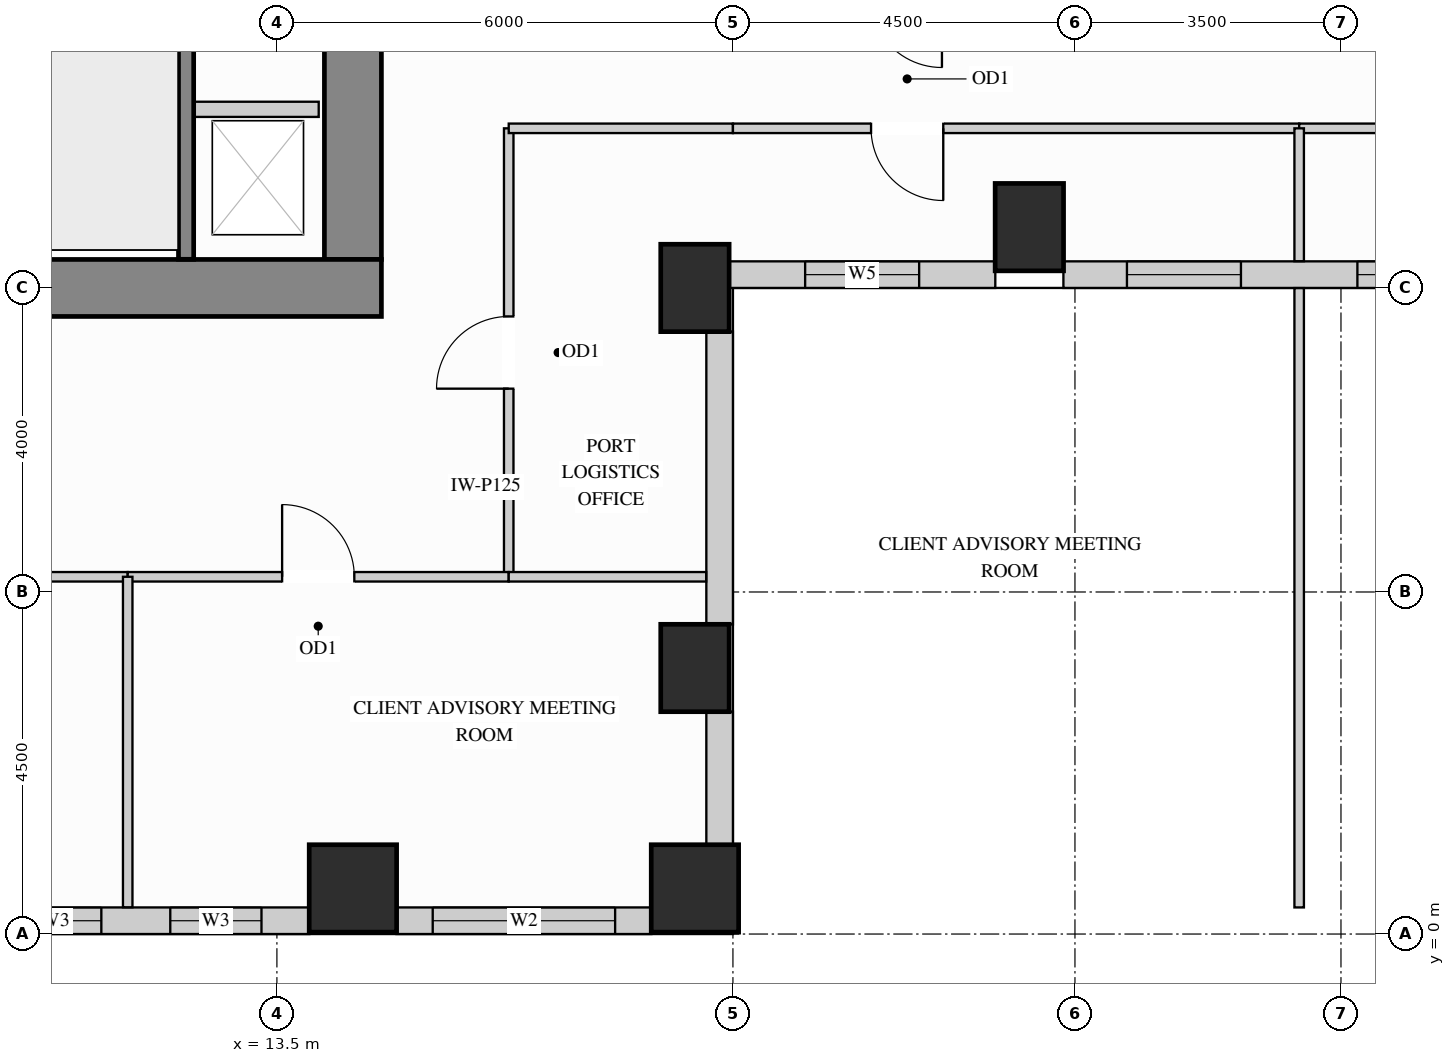
"""IFC4 building model, lengths in metres.
Left out: names, types, materials, properties, quantities, classifications, styles, units other than length and angle.
Written with IfcOpenShell. Run it as: python <this file> out.ifc"""

import sys

from ifc_helpers import new_model, si_unit, direction, frame, frame_2d, origin, origin_2d, place, context, subcontext, project, spatial, rectangle, extrude, source, transform, mapped, element, fill, save


model = new_model("IFC4")
c1 = context("Model", 3, precision=1e-05, world=origin(), true_north=direction((0.0, 1.0)))
c2 = subcontext(c1, "Body", "Model", "MODEL_VIEW")
j1 = project(units=[si_unit("LENGTHUNIT", "METRE"), si_unit("PLANEANGLEUNIT", "RADIAN")], contexts=[c1])
p1 = place(None, origin())
s1 = spatial("IfcSite", under=j1, at=p1, CompositionType="ELEMENT")
p2 = place(p1, origin())
s2 = spatial("IfcBuilding", under=s1, at=p2, CompositionType="ELEMENT")
p3 = place(p2, frame((0.0, 0.0, 124.2)))
s3 = spatial("IfcBuildingStorey", under=s2, at=p3, CompositionType="ELEMENT", Elevation=124.2)
m1 = source(origin(), c2, "Body", "SweptSolid", [
    extrude(rectangle(XDim=0.9, YDim=1.15, at=origin_2d()), origin(), (0.0, 0.0, 1.0), 3.38),
])
for number, where, z_axis, x_axis in (
    (1, (19.0, 3.5, 0.0), (0.0, 0.0, 1.0), (1.0, 0.0, 0.0)),
    (2, (19.0, 8.5, 0.0), (0.0, 0.0, 1.0), (1.0, 0.0, 0.0)),
    (3, (23.4, 9.3, 0.0), (0.0, 0.0, 1.0), (1.0, 0.0, 0.0)),
):
    element("IfcColumn", number, at=place(p3, frame(where, z_axis=z_axis, x_axis=x_axis)), inside=s3, PredefinedType="COLUMN", context=c2, shape_type="MappedRepresentation", body=[
        mapped(m1, transform((0.0, 0.0, 0.0), x_axis=(1.0, 0.0, 0.0), y_axis=(0.0, 1.0, 0.0), z_axis=(0.0, 0.0, 1.0))),
    ])
m2 = source(origin(), c2, "Body", "SweptSolid", [
    extrude(rectangle(XDim=1.15, YDim=1.15, at=origin_2d()), origin(), (0.0, 0.0, 1.0), 3.38),
])
for number, where, z_axis, x_axis in (
    (4, (14.5, 0.6, 0.0), (0.0, 0.0, 1.0), (1.0, 0.0, 0.0)),
    (5, (19.0, 0.6, 0.0), (0.0, 0.0, 1.0), (1.0, 0.0, 0.0)),
):
    element("IfcColumn", number, at=place(p3, frame(where, z_axis=z_axis, x_axis=x_axis)), inside=s3, PredefinedType="COLUMN", context=c2, shape_type="MappedRepresentation", body=[
        mapped(m2, transform((0.0, 0.0, 0.0), x_axis=(1.0, 0.0, 0.0), y_axis=(0.0, 1.0, 0.0), z_axis=(0.0, 0.0, 1.0))),
    ])
m3 = source(origin(), c2, "Body", "SweptSolid", [
    extrude(rectangle(XDim=9.945, YDim=0.75, at=frame_2d((4.973, 0.0))), origin(), (0.0, 0.0, 1.0), 3.38),
])
p4 = place(p3, frame((14.5, 8.875, 0.0), z_axis=(0.0, 0.0, 1.0), x_axis=(0.0, 1.0, 0.0)))
e6 = element("IfcWall", 6, at=p4, inside=s3, PredefinedType="SHEAR", context=c2, shape_type="MappedRepresentation", body=[
    mapped(m3, transform((0.0, 0.0, 0.0), x_axis=(1.0, 0.0, 0.0), y_axis=(0.0, 1.0, 0.0), z_axis=(0.0, 0.0, 1.0))),
])
m4 = source(origin(), c2, "Body", "SweptSolid", [
    extrude(rectangle(XDim=10.75, YDim=0.75, at=frame_2d((5.375, 0.0))), origin(), (0.0, 0.0, 1.0), 3.38),
])
p5 = place(p3, frame((4.125, 8.5, 0.0), z_axis=(0.0, 0.0, 1.0), x_axis=(1.0, 0.0, 0.0)))
e7 = element("IfcWall", 7, at=p5, inside=s3, PredefinedType="SHEAR", context=c2, shape_type="MappedRepresentation", body=[
    mapped(m4, transform((0.0, 0.0, 0.0), x_axis=(1.0, 0.0, 0.0), y_axis=(0.0, 1.0, 0.0), z_axis=(0.0, 0.0, 1.0))),
])
p6 = place(p3, frame((9.573, 0.175, 0.0), z_axis=(0.0, 0.0, 1.0), x_axis=(1.0, 0.0, 0.0)))
e8 = element("IfcWall", 8, at=p6, inside=s3, PredefinedType="SOLIDWALL", context=c2, shape_type="SweptSolid", body=[
    extrude(rectangle(XDim=4.354, YDim=0.35, at=frame_2d((2.177, 0.0))), origin(), (0.0, 0.0, 1.0), 3.365),
])
p7 = place(p6, frame((0.417, 0.0, 0.78)))
e9 = element("IfcOpeningElement", 9, at=p7, cuts=e8, PredefinedType="OPENING", context=c2, shape_type="SweptSolid", body=[
    extrude(rectangle(XDim=1.2, YDim=2.1, at=frame_2d((0.6, 1.05))), frame((0.0, 0.185, 0.0), z_axis=(0.0, -1.0, 0.0), x_axis=(1.0, 0.0, 0.0)), (0.0, 0.0, 1.0), 0.37),
])
p8 = place(p6, frame((2.524, 0.0, 0.78)))
e10 = element("IfcOpeningElement", 10, at=p8, cuts=e8, PredefinedType="OPENING", context=c2, shape_type="SweptSolid", body=[
    extrude(rectangle(XDim=1.2, YDim=2.1, at=frame_2d((0.6, 1.05))), frame((0.0, 0.185, 0.0), z_axis=(0.0, -1.0, 0.0), x_axis=(1.0, 0.0, 0.0)), (0.0, 0.0, 1.0), 0.37),
])
p9 = place(p3, frame((15.073, 0.175, 0.0), z_axis=(0.0, 0.0, 1.0), x_axis=(1.0, 0.0, 0.0)))
e11 = element("IfcWall", 11, at=p9, inside=s3, PredefinedType="SOLIDWALL", context=c2, shape_type="SweptSolid", body=[
    extrude(rectangle(XDim=3.354, YDim=0.35, at=frame_2d((1.677, 0.0))), origin(), (0.0, 0.0, 1.0), 3.365),
])
p10 = place(p9, frame((0.477, 0.0, 0.78)))
e12 = element("IfcOpeningElement", 12, at=p10, cuts=e11, PredefinedType="OPENING", context=c2, shape_type="SweptSolid", body=[
    extrude(rectangle(XDim=2.4, YDim=2.1, at=frame_2d((1.2, 1.05))), frame((0.0, 0.185, 0.0), z_axis=(0.0, -1.0, 0.0), x_axis=(1.0, 0.0, 0.0)), (0.0, 0.0, 1.0), 0.37),
])
m5 = source(origin(), c2, "Body", "SweptSolid", [
    extrude(rectangle(XDim=1.754, YDim=0.35, at=frame_2d((0.877, 0.0))), origin(), (0.0, 0.0, 1.0), 2.519),
])
p11 = place(p3, frame((19.325, 1.173, 0.0), z_axis=(0.0, 0.0, 1.0), x_axis=(0.0, 1.0, 0.0)))
e13 = element("IfcWall", 13, at=p11, inside=s3, PredefinedType="SOLIDWALL", context=c2, shape_type="MappedRepresentation", body=[
    mapped(m5, transform((0.0, 0.0, 0.0), x_axis=(1.0, 0.0, 0.0), y_axis=(0.0, 1.0, 0.0), z_axis=(0.0, 0.0, 1.0))),
])
m6 = source(origin(), c2, "Body", "SweptSolid", [
    extrude(rectangle(XDim=3.854, YDim=0.35, at=frame_2d((1.927, 0.0))), origin(), (0.0, 0.0, 1.0), 2.519),
])
p12 = place(p3, frame((19.325, 4.073, 0.0), z_axis=(0.0, 0.0, 1.0), x_axis=(0.0, 1.0, 0.0)))
e14 = element("IfcWall", 14, at=p12, inside=s3, PredefinedType="SOLIDWALL", context=c2, shape_type="MappedRepresentation", body=[
    mapped(m6, transform((0.0, 0.0, 0.0), x_axis=(1.0, 0.0, 0.0), y_axis=(0.0, 1.0, 0.0), z_axis=(0.0, 0.0, 1.0))),
])
p13 = place(p3, frame((19.448, 8.675, 0.0), z_axis=(0.0, 0.0, 1.0), x_axis=(1.0, 0.0, 0.0)))
e15 = element("IfcWall", 15, at=p13, inside=s3, PredefinedType="SOLIDWALL", context=c2, shape_type="SweptSolid", body=[
    extrude(rectangle(XDim=3.504, YDim=0.35, at=frame_2d((1.752, 0.0))), origin(), (0.0, 0.0, 1.0), 3.365),
])
p14 = place(p13, frame((1.002, 0.0, 0.78)))
e16 = element("IfcOpeningElement", 16, at=p14, cuts=e15, PredefinedType="OPENING", context=c2, shape_type="SweptSolid", body=[
    extrude(rectangle(XDim=1.5, YDim=2.0, at=frame_2d((0.75, 1.0))), frame((0.0, 0.185, 0.0), z_axis=(0.0, -1.0, 0.0), x_axis=(1.0, 0.0, 0.0)), (0.0, 0.0, 1.0), 0.37),
])
p15 = place(p3, frame((23.848, 8.675, 0.0), z_axis=(0.0, 0.0, 1.0), x_axis=(1.0, 0.0, 0.0)))
e17 = element("IfcWall", 17, at=p15, inside=s3, PredefinedType="SOLIDWALL", context=c2, shape_type="SweptSolid", body=[
    extrude(rectangle(XDim=6.204, YDim=0.35, at=frame_2d((3.102, 0.0))), origin(), (0.0, 0.0, 1.0), 3.365),
])
p16 = place(p15, frame((0.836, 0.0, 0.78)))
e18 = element("IfcOpeningElement", 18, at=p16, cuts=e17, PredefinedType="OPENING", context=c2, shape_type="SweptSolid", body=[
    extrude(rectangle(XDim=1.5, YDim=2.0, at=frame_2d((0.75, 1.0))), frame((0.0, 0.185, 0.0), z_axis=(0.0, -1.0, 0.0), x_axis=(1.0, 0.0, 0.0)), (0.0, 0.0, 1.0), 0.37),
])
p17 = place(p15, frame((3.868, 0.0, 0.78)))
e19 = element("IfcOpeningElement", 19, at=p17, cuts=e17, PredefinedType="OPENING", context=c2, shape_type="SweptSolid", body=[
    extrude(rectangle(XDim=1.5, YDim=2.0, at=frame_2d((0.75, 1.0))), frame((0.0, 0.185, 0.0), z_axis=(0.0, -1.0, 0.0), x_axis=(1.0, 0.0, 0.0)), (0.0, 0.0, 1.0), 0.37),
])
p18 = place(p3, frame((16.55, 4.7, 0.0), z_axis=(0.0, 0.0, 1.0), x_axis=(0.0, 1.0, 0.0)))
e20 = element("IfcWall", 20, at=p18, inside=s3, PredefinedType="PARTITIONING", context=c2, shape_type="SweptSolid", body=[
    extrude(rectangle(XDim=5.9, YDim=0.125, at=frame_2d((2.95, 0.0))), origin(), (0.0, 0.0, 1.0), 3.365),
])
p19 = place(p18, frame((2.475, 0.0, 0.0)))
e21 = element("IfcOpeningElement", 21, at=p19, cuts=e20, PredefinedType="OPENING", context=c2, shape_type="SweptSolid", body=[
    extrude(rectangle(XDim=0.95, YDim=2.15, at=frame_2d((0.475, 1.075))), frame((0.0, 0.073, 0.0), z_axis=(0.0, -1.0, 0.0), x_axis=(1.0, 0.0, 0.0)), (0.0, 0.0, 1.0), 0.145),
])
m7 = source(origin(), c2, "Body", "SweptSolid", [
    extrude(rectangle(XDim=2.95, YDim=0.125, at=frame_2d((1.475, 0.0))), origin(), (0.0, 0.0, 1.0), 3.365),
])
p20 = place(p3, frame((16.55, 10.6, 0.0), z_axis=(0.0, 0.0, 1.0), x_axis=(1.0, 0.0, 0.0)))
e22 = element("IfcWall", 22, at=p20, inside=s3, PredefinedType="PARTITIONING", context=c2, shape_type="MappedRepresentation", body=[
    mapped(m7, transform((0.0, 0.0, 0.0), x_axis=(1.0, 0.0, 0.0), y_axis=(0.0, 1.0, 0.0), z_axis=(0.0, 0.0, 1.0))),
])
p21 = place(p3, frame((19.5, 10.6, 0.0), z_axis=(0.0, 0.0, 1.0), x_axis=(1.0, 0.0, 0.0)))
e23 = element("IfcWall", 23, at=p21, inside=s3, PredefinedType="PARTITIONING", context=c2, shape_type="SweptSolid", body=[
    extrude(rectangle(XDim=7.45, YDim=0.125, at=frame_2d((3.725, 0.0))), origin(), (0.0, 0.0, 1.0), 3.365),
])
p22 = place(p21, frame((1.817, 0.0, 0.0)))
e24 = element("IfcOpeningElement", 24, at=p22, cuts=e23, PredefinedType="OPENING", context=c2, shape_type="SweptSolid", body=[
    extrude(rectangle(XDim=0.95, YDim=2.15, at=frame_2d((0.475, 1.075))), frame((0.0, 0.073, 0.0), z_axis=(0.0, -1.0, 0.0), x_axis=(1.0, 0.0, 0.0)), (0.0, 0.0, 1.0), 0.145),
])
p23 = place(p3, frame((26.95, 10.6, 0.0), z_axis=(0.0, 0.0, 1.0), x_axis=(1.0, 0.0, 0.0)))
e25 = element("IfcWall", 25, at=p23, inside=s3, PredefinedType="PARTITIONING", context=c2, shape_type="SweptSolid", body=[
    extrude(rectangle(XDim=7.45, YDim=0.125, at=frame_2d((3.725, 0.0))), origin(), (0.0, 0.0, 1.0), 3.365),
])
p24 = place(p23, frame((4.683, 0.0, 0.0)))
e26 = element("IfcOpeningElement", 26, at=p24, cuts=e25, PredefinedType="OPENING", context=c2, shape_type="SweptSolid", body=[
    extrude(rectangle(XDim=0.95, YDim=2.15, at=frame_2d((0.475, 1.075))), frame((0.0, 0.073, 0.0), z_axis=(0.0, -1.0, 0.0), x_axis=(1.0, 0.0, 0.0)), (0.0, 0.0, 1.0), 0.145),
])
m8 = source(origin(), c2, "Body", "SweptSolid", [
    extrude(rectangle(XDim=8.148, YDim=0.125, at=frame_2d((4.074, 0.0))), origin(), (0.0, 0.0, 1.0), 3.365),
])
p25 = place(p3, frame((26.95, 0.35, 0.0), z_axis=(0.0, 0.0, 1.0), x_axis=(0.0, 1.0, 0.0)))
e27 = element("IfcWall", 27, at=p25, inside=s3, PredefinedType="PARTITIONING", context=c2, shape_type="MappedRepresentation", body=[
    mapped(m8, transform((0.0, 0.0, 0.0), x_axis=(1.0, 0.0, 0.0), y_axis=(0.0, 1.0, 0.0), z_axis=(0.0, 0.0, 1.0))),
])
m9 = source(origin(), c2, "Body", "SweptSolid", [
    extrude(rectangle(XDim=1.748, YDim=0.125, at=frame_2d((0.874, 0.0))), origin(), (0.0, 0.0, 1.0), 3.365),
])
p26 = place(p3, frame((26.95, 8.852, 0.0), z_axis=(0.0, 0.0, 1.0), x_axis=(0.0, 1.0, 0.0)))
e28 = element("IfcWall", 28, at=p26, inside=s3, PredefinedType="PARTITIONING", context=c2, shape_type="MappedRepresentation", body=[
    mapped(m9, transform((0.0, 0.0, 0.0), x_axis=(1.0, 0.0, 0.0), y_axis=(0.0, 1.0, 0.0), z_axis=(0.0, 0.0, 1.0))),
])
p27 = place(p3, frame((2.45, 4.7, 0.0), z_axis=(0.0, 0.0, 1.0), x_axis=(1.0, 0.0, 0.0)))
e29 = element("IfcWall", 29, at=p27, inside=s3, PredefinedType="PARTITIONING", context=c2, shape_type="SweptSolid", body=[
    extrude(rectangle(XDim=9.087, YDim=0.125, at=frame_2d((4.543, 0.0))), origin(), (0.0, 0.0, 1.0), 2.828),
])
p28 = place(p27, frame((4.069, 0.0, 0.0)))
e30 = element("IfcOpeningElement", 30, at=p28, cuts=e29, PredefinedType="OPENING", context=c2, shape_type="SweptSolid", body=[
    extrude(rectangle(XDim=0.95, YDim=2.15, at=frame_2d((0.475, 1.075))), frame((0.0, 0.073, 0.0), z_axis=(0.0, -1.0, 0.0), x_axis=(1.0, 0.0, 0.0)), (0.0, 0.0, 1.0), 0.145),
])
p29 = place(p3, frame((11.537, 4.7, 0.0), z_axis=(0.0, 0.0, 1.0), x_axis=(1.0, 0.0, 0.0)))
e31 = element("IfcWall", 31, at=p29, inside=s3, PredefinedType="PARTITIONING", context=c2, shape_type="SweptSolid", body=[
    extrude(rectangle(XDim=5.013, YDim=0.125, at=frame_2d((2.506, 0.0))), origin(), (0.0, 0.0, 1.0), 2.828),
])
p30 = place(p29, frame((2.031, 0.0, 0.0)))
e32 = element("IfcOpeningElement", 32, at=p30, cuts=e31, PredefinedType="OPENING", context=c2, shape_type="SweptSolid", body=[
    extrude(rectangle(XDim=0.95, YDim=2.15, at=frame_2d((0.475, 1.075))), frame((0.0, 0.073, 0.0), z_axis=(0.0, -1.0, 0.0), x_axis=(1.0, 0.0, 0.0)), (0.0, 0.0, 1.0), 0.145),
])
m10 = source(origin(), c2, "Body", "SweptSolid", [
    extrude(rectangle(XDim=2.598, YDim=0.125, at=frame_2d((1.299, 0.0))), origin(), (0.0, 0.0, 1.0), 2.828),
])
p31 = place(p3, frame((16.55, 4.7, 0.0), z_axis=(0.0, 0.0, 1.0), x_axis=(1.0, 0.0, 0.0)))
e33 = element("IfcWall", 33, at=p31, inside=s3, PredefinedType="PARTITIONING", context=c2, shape_type="MappedRepresentation", body=[
    mapped(m10, transform((0.0, 0.0, 0.0), x_axis=(1.0, 0.0, 0.0), y_axis=(0.0, 1.0, 0.0), z_axis=(0.0, 0.0, 1.0))),
])
m11 = source(origin(), c2, "Body", "SweptSolid", [
    extrude(rectangle(XDim=4.348, YDim=0.125, at=frame_2d((2.174, 0.0))), origin(), (0.0, 0.0, 1.0), 3.365),
])
p32 = place(p3, frame((11.537, 0.352, 0.0), z_axis=(0.0, 0.0, 1.0), x_axis=(0.0, 1.0, 0.0)))
e34 = element("IfcWall", 34, at=p32, inside=s3, PredefinedType="PARTITIONING", context=c2, shape_type="MappedRepresentation", body=[
    mapped(m11, transform((0.0, 0.0, 0.0), x_axis=(1.0, 0.0, 0.0), y_axis=(0.0, 1.0, 0.0), z_axis=(0.0, 0.0, 1.0))),
])
m12 = source(origin(), c2, "Body", "SweptSolid", [
    extrude(rectangle(XDim=1.63, YDim=0.2, at=frame_2d((0.815, 0.0))), origin(), (0.0, 0.0, 1.0), 3.365),
])
p33 = place(p3, frame((12.42, 10.85, 0.0), z_axis=(0.0, 0.0, 1.0), x_axis=(1.0, 0.0, 0.0)))
e35 = element("IfcWall", 35, at=p33, inside=s3, PredefinedType="PARTITIONING", context=c2, shape_type="MappedRepresentation", body=[
    mapped(m12, transform((0.0, 0.0, 0.0), x_axis=(1.0, 0.0, 0.0), y_axis=(0.0, 1.0, 0.0), z_axis=(0.0, 0.0, 1.0))),
])
m13 = source(origin(), c2, "Body", "SweptSolid", [
    extrude(rectangle(XDim=3.678, YDim=0.2, at=frame_2d((1.839, 0.0))), origin(), (0.0, 0.0, 1.0), 3.38),
])
p34 = place(p3, frame((12.305, 8.877, 0.0), z_axis=(0.0, 0.0, 1.0), x_axis=(0.0, 1.0, 0.0)))
e36 = element("IfcWall", 36, at=p34, inside=s3, PredefinedType="SHEAR", context=c2, shape_type="MappedRepresentation", body=[
    mapped(m13, transform((0.0, 0.0, 0.0), x_axis=(1.0, 0.0, 0.0), y_axis=(0.0, 1.0, 0.0), z_axis=(0.0, 0.0, 1.0))),
])
m14 = source(origin(), c2, "Body", "SweptSolid", [
    extrude(rectangle(XDim=0.95, YDim=2.15, at=frame_2d((0.475, 1.075))), frame((0.0, 0.025, 0.0), z_axis=(0.0, -1.0, 0.0), x_axis=(1.0, 0.0, 0.0)), (0.0, 0.0, 1.0), 0.05),
])
p35 = place(p19, origin())
e37 = element("IfcDoor", 37, at=p35, inside=s3, OperationType="SINGLE_SWING_LEFT", PredefinedType="DOOR", context=c2, shape_type="MappedRepresentation", body=[
    mapped(m14, transform((0.0, 0.0, 0.0), x_axis=(1.0, 0.0, 0.0), y_axis=(0.0, 1.0, 0.0), z_axis=(0.0, 0.0, 1.0))),
])
fill(e21, e37)
p36 = place(p30, origin())
e38 = element("IfcDoor", 38, at=p36, inside=s3, OperationType="SINGLE_SWING_LEFT", PredefinedType="DOOR", context=c2, shape_type="MappedRepresentation", body=[
    mapped(m14, transform((0.0, 0.0, 0.0), x_axis=(1.0, 0.0, 0.0), y_axis=(0.0, 1.0, 0.0), z_axis=(0.0, 0.0, 1.0))),
])
fill(e32, e38)
p37 = place(p22, origin())
e39 = element("IfcDoor", 39, at=p37, inside=s3, OperationType="SINGLE_SWING_RIGHT", PredefinedType="DOOR", context=c2, shape_type="MappedRepresentation", body=[
    mapped(m14, transform((0.0, 0.0, 0.0), x_axis=(1.0, 0.0, 0.0), y_axis=(0.0, 1.0, 0.0), z_axis=(0.0, 0.0, 1.0))),
])
fill(e24, e39)
m15 = source(origin(), c2, "Body", "SweptSolid", [
    extrude(rectangle(XDim=2.4, YDim=2.1, at=frame_2d((1.2, 1.05))), frame((0.0, 0.03, 0.0), z_axis=(0.0, -1.0, 0.0), x_axis=(1.0, 0.0, 0.0)), (0.0, 0.0, 1.0), 0.06),
])
p38 = place(p10, origin())
e40 = element("IfcWindow", 40, at=p38, inside=s3, PartitioningType="SINGLE_PANEL", PredefinedType="WINDOW", context=c2, shape_type="MappedRepresentation", body=[
    mapped(m15, transform((0.0, 0.0, 0.0), x_axis=(1.0, 0.0, 0.0), y_axis=(0.0, 1.0, 0.0), z_axis=(0.0, 0.0, 1.0))),
])
fill(e12, e40)
m16 = source(origin(), c2, "Body", "SweptSolid", [
    extrude(rectangle(XDim=1.2, YDim=2.1, at=frame_2d((0.6, 1.05))), frame((0.0, 0.03, 0.0), z_axis=(0.0, -1.0, 0.0), x_axis=(1.0, 0.0, 0.0)), (0.0, 0.0, 1.0), 0.06),
])
p39 = place(p7, origin())
e41 = element("IfcWindow", 41, at=p39, inside=s3, PartitioningType="SINGLE_PANEL", PredefinedType="WINDOW", context=c2, shape_type="MappedRepresentation", body=[
    mapped(m16, transform((0.0, 0.0, 0.0), x_axis=(1.0, 0.0, 0.0), y_axis=(0.0, 1.0, 0.0), z_axis=(0.0, 0.0, 1.0))),
])
fill(e9, e41)
p40 = place(p8, origin())
e42 = element("IfcWindow", 42, at=p40, inside=s3, PartitioningType="SINGLE_PANEL", PredefinedType="WINDOW", context=c2, shape_type="MappedRepresentation", body=[
    mapped(m16, transform((0.0, 0.0, 0.0), x_axis=(1.0, 0.0, 0.0), y_axis=(0.0, 1.0, 0.0), z_axis=(0.0, 0.0, 1.0))),
])
fill(e10, e42)
m17 = source(origin(), c2, "Body", "SweptSolid", [
    extrude(rectangle(XDim=1.5, YDim=2.0, at=frame_2d((0.75, 1.0))), frame((0.0, 0.03, 0.0), z_axis=(0.0, -1.0, 0.0), x_axis=(1.0, 0.0, 0.0)), (0.0, 0.0, 1.0), 0.06),
])
p41 = place(p14, origin())
e43 = element("IfcWindow", 43, at=p41, inside=s3, PartitioningType="SINGLE_PANEL", PredefinedType="WINDOW", context=c2, shape_type="MappedRepresentation", body=[
    mapped(m17, transform((0.0, 0.0, 0.0), x_axis=(1.0, 0.0, 0.0), y_axis=(0.0, 1.0, 0.0), z_axis=(0.0, 0.0, 1.0))),
])
fill(e16, e43)
p42 = place(p16, origin())
e44 = element("IfcWindow", 44, at=p42, inside=s3, PartitioningType="SINGLE_PANEL", PredefinedType="WINDOW", context=c2, shape_type="MappedRepresentation", body=[
    mapped(m17, transform((0.0, 0.0, 0.0), x_axis=(1.0, 0.0, 0.0), y_axis=(0.0, 1.0, 0.0), z_axis=(0.0, 0.0, 1.0))),
])
fill(e18, e44)
p43 = place(p17, origin())
e45 = element("IfcWindow", 45, at=p43, inside=s3, PartitioningType="SINGLE_PANEL", PredefinedType="WINDOW", context=c2, shape_type="MappedRepresentation", body=[
    mapped(m17, transform((0.0, 0.0, 0.0), x_axis=(1.0, 0.0, 0.0), y_axis=(0.0, 1.0, 0.0), z_axis=(0.0, 0.0, 1.0))),
])
fill(e19, e45)
save(model, sys.argv[1])
